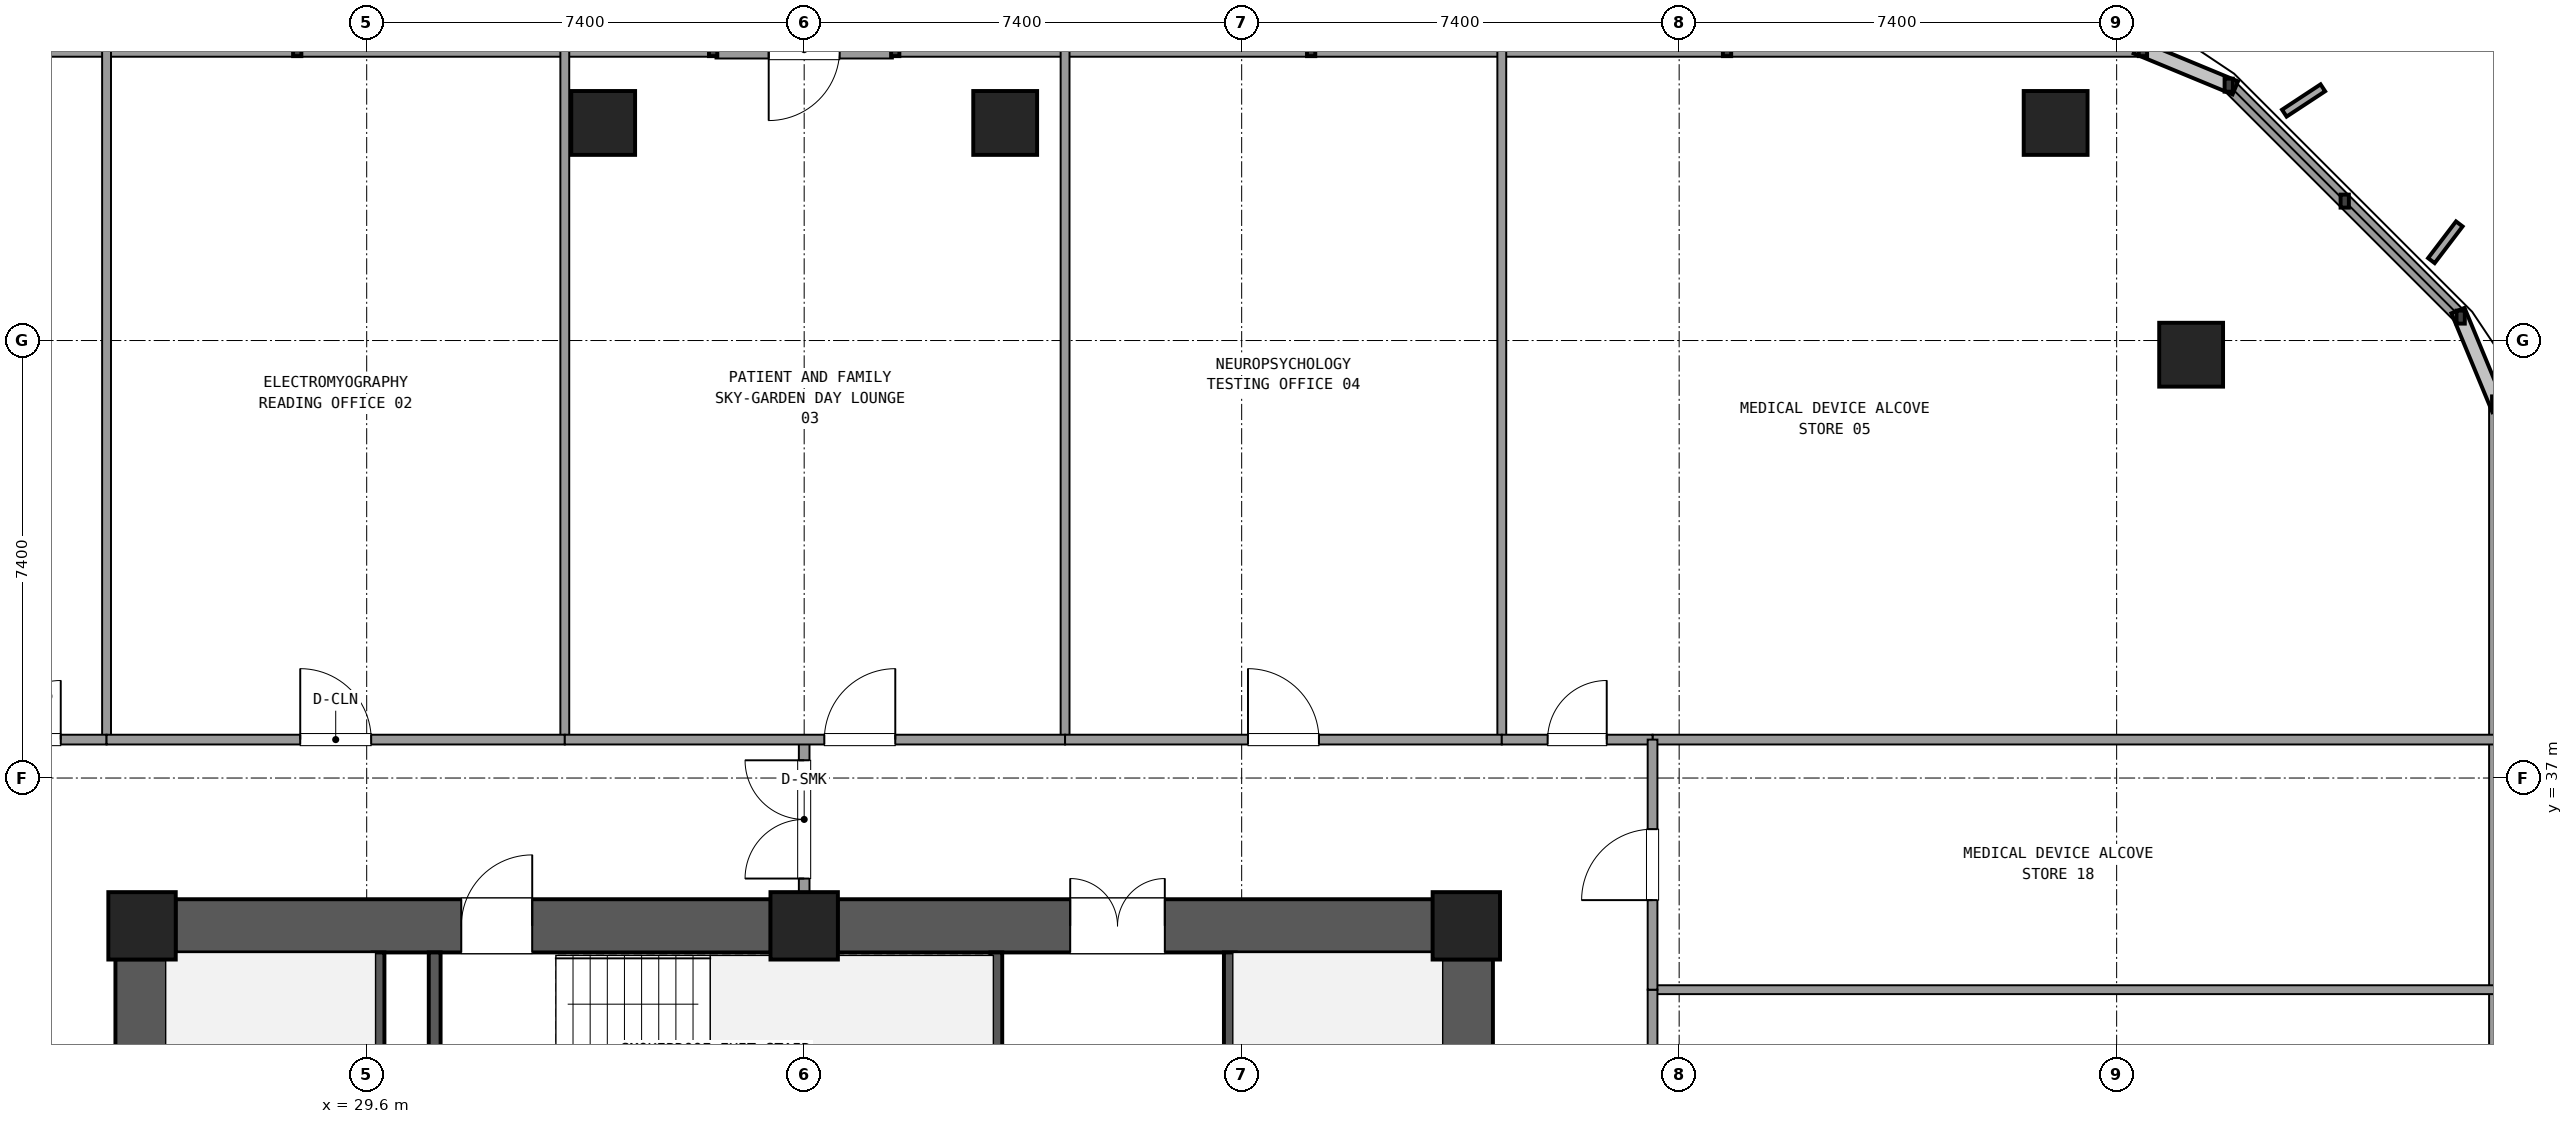
"""IFC4 building model, lengths in metres.
Left out: names, types, materials, properties, quantities, classifications, styles, units other than length and angle.
Written with IfcOpenShell. Run it as: python <this file> out.ifc"""

import sys

from ifc_helpers import new_model, si_unit, direction, frame, frame_2d, origin, origin_2d, place, context, subcontext, project, spatial, rectangle, extrude, element, fill, save


model = new_model("IFC4")
c1 = context("Model", 3, precision=1e-05, world=origin(), true_north=direction((0.0, 1.0)))
c2 = subcontext(c1, "Body", "Model", "MODEL_VIEW")
j1 = project(units=[si_unit("LENGTHUNIT", "METRE"), si_unit("PLANEANGLEUNIT", "RADIAN")], contexts=[c1])
p1 = place(None, origin())
s1 = spatial("IfcSite", under=j1, at=p1, CompositionType="ELEMENT")
p2 = place(p1, origin())
s2 = spatial("IfcBuilding", under=s1, at=p2, CompositionType="ELEMENT")
p3 = place(p2, frame((0.0, 0.0, 67.14)))
s3 = spatial("IfcBuildingStorey", under=s2, at=p3, CompositionType="ELEMENT", Elevation=67.14)
for number, where, z_axis, x_axis in (
    (1, (48.2, 34.5, 0.0), (0.0, 0.0, 1.0), (1.0, 0.0, 0.0)),
    (2, (37.0, 34.5, 0.0), (0.0, 0.0, 1.0), (1.0, 0.0, 0.0)),
    (3, (25.8, 34.5, 0.0), (0.0, 0.0, 1.0), (1.0, 0.0, 0.0)),
):
    element("IfcColumn", number, at=place(p3, frame(where, z_axis=z_axis, x_axis=x_axis)), inside=s3, PredefinedType="COLUMN", context=c2, shape_type="SweptSolid", body=[
        extrude(rectangle(XDim=1.14, YDim=1.14, at=origin_2d()), origin(), (0.0, 0.0, 1.0), 3.6),
    ])
p4 = place(p3, frame((48.2, 26.465, 0.0), z_axis=(0.0, 0.0, 1.0), x_axis=(0.0, 1.0, 0.0)))
e4 = element("IfcWall", 4, at=p4, inside=s3, PredefinedType="SHEAR", context=c2, shape_type="SweptSolid", body=[
    extrude(rectangle(XDim=7.47, YDim=0.9, at=frame_2d((3.735, 0.0))), origin(), (0.0, 0.0, 1.0), 3.3),
])
p5 = place(p3, frame((47.635, 34.5, 0.0), z_axis=(0.0, 0.0, 1.0), x_axis=(-1.0, 0.0, 0.0)))
e5 = element("IfcWall", 5, at=p5, inside=s3, PredefinedType="SHEAR", context=c2, shape_type="SweptSolid", body=[
    extrude(rectangle(XDim=10.07, YDim=0.9, at=frame_2d((5.035, 0.0))), origin(), (0.0, 0.0, 1.0), 3.3),
])
p6 = place(p5, frame((4.535, 0.0, 0.0)))
e6 = element("IfcOpeningElement", 6, at=p6, cuts=e5, PredefinedType="OPENING", context=c2, shape_type="SweptSolid", body=[
    extrude(rectangle(XDim=1.6, YDim=2.2, at=frame_2d((0.8, 1.1))), frame((0.0, 0.46, 0.0), z_axis=(0.0, -1.0, 0.0), x_axis=(1.0, 0.0, 0.0)), (0.0, 0.0, 1.0), 0.92),
])
p7 = place(p3, frame((36.435, 34.5, 0.0), z_axis=(0.0, 0.0, 1.0), x_axis=(-1.0, 0.0, 0.0)))
e7 = element("IfcWall", 7, at=p7, inside=s3, PredefinedType="SHEAR", context=c2, shape_type="SweptSolid", body=[
    extrude(rectangle(XDim=10.07, YDim=0.9, at=frame_2d((5.035, 0.0))), origin(), (0.0, 0.0, 1.0), 3.3),
])
p8 = place(p7, frame((4.035, 0.0, 0.0)))
e8 = element("IfcOpeningElement", 8, at=p8, cuts=e7, PredefinedType="OPENING", context=c2, shape_type="SweptSolid", body=[
    extrude(rectangle(XDim=1.2, YDim=2.15, at=frame_2d((0.6, 1.075))), frame((0.0, 0.46, 0.0), z_axis=(0.0, -1.0, 0.0), x_axis=(1.0, 0.0, 0.0)), (0.0, 0.0, 1.0), 0.92),
])
p9 = place(p3, frame((25.8, 33.935, 0.0), z_axis=(0.0, 0.0, 1.0), x_axis=(0.0, -1.0, 0.0)))
e9 = element("IfcWall", 9, at=p9, inside=s3, PredefinedType="SHEAR", context=c2, shape_type="SweptSolid", body=[
    extrude(rectangle(XDim=7.47, YDim=0.9, at=frame_2d((3.735, 0.0))), origin(), (0.0, 0.0, 1.0), 3.3),
])
for number, where, z_axis, x_axis in (
    (10, (60.46, 44.16, 0.0), (0.0, 0.0, 1.0), (1.0, 0.0, 0.0)),
    (11, (58.168, 48.08, 0.0), (0.0, 0.0, 1.0), (1.0, 0.0, 0.0)),
    (12, (40.4, 48.08, 0.0), (0.0, 0.0, 1.0), (1.0, 0.0, 0.0)),
    (13, (33.6, 48.08, 0.0), (0.0, 0.0, 1.0), (1.0, 0.0, 0.0)),
):
    element("IfcColumn", number, at=place(p3, frame(where, z_axis=z_axis, x_axis=x_axis)), inside=s3, PredefinedType="COLUMN", context=c2, shape_type="SweptSolid", body=[
        extrude(rectangle(XDim=1.08, YDim=1.08, at=origin_2d()), origin(), (0.0, 0.0, 1.0), 3.6),
    ])
p10 = place(p3, frame((65.62, 8.455, 0.0), z_axis=(0.0, 0.0, 1.0), x_axis=(0.0, 1.0, 0.0)))
e14 = element("IfcWall", 14, at=p10, inside=s3, PredefinedType="SOLIDWALL", context=c2, shape_type="SweptSolid", body=[
    extrude(rectangle(XDim=34.89, YDim=0.24, at=frame_2d((17.445, 0.0))), origin(), (0.0, 0.0, 1.0), 0.85),
])
p11 = place(p3, frame((65.019, 44.796, 0.0), z_axis=(0.0, 0.0, 1.0), x_axis=(-0.707106781187, 0.707106781187, 0.0)))
e15 = element("IfcWall", 15, at=p11, inside=s3, PredefinedType="SOLIDWALL", context=c2, shape_type="SweptSolid", body=[
    extrude(rectangle(XDim=5.548, YDim=0.24, at=frame_2d((2.774, 0.0))), origin(), (0.0, 0.0, 1.0), 0.85),
])
p12 = place(p3, frame((38.5, 49.32, 0.0), z_axis=(0.0, 0.0, 1.0), x_axis=(-1.0, 0.0, 0.0)))
e16 = element("IfcWall", 16, at=p12, inside=s3, PredefinedType="SOLIDWALL", context=c2, shape_type="SweptSolid", body=[
    extrude(rectangle(XDim=3.0, YDim=0.3, at=frame_2d((1.5, 0.0))), origin(), (0.0, 0.0, 1.0), 2.63),
])
p13 = place(p12, frame((0.9, 0.0, 0.0)))
e17 = element("IfcOpeningElement", 17, at=p13, cuts=e16, PredefinedType="OPENING", context=c2, shape_type="SweptSolid", body=[
    extrude(rectangle(XDim=1.2, YDim=2.2, at=frame_2d((0.6, 1.1))), frame((0.0, 0.16, 0.0), z_axis=(0.0, -1.0, 0.0), x_axis=(1.0, 0.0, 0.0)), (0.0, 0.0, 1.0), 0.32),
])
for number, where, z_axis, x_axis in (
    (18, (59.645, 49.32, 0.0), (0.0, 0.0, 1.0), (-1.0, 0.0, 0.0)),
    (19, (35.46, 49.32, 0.0), (0.0, 0.0, 1.0), (-1.0, 0.0, 0.0)),
):
    element("IfcWall", number, at=place(p3, frame(where, z_axis=z_axis, x_axis=x_axis)), inside=s3, PredefinedType="SOLIDWALL", context=c2, shape_type="SweptSolid", body=[
        extrude(rectangle(XDim=21.105, YDim=0.24, at=frame_2d((10.552, 0.0))), origin(), (0.0, 0.0, 1.0), 0.85),
    ])
for number, where, z_axis, x_axis in (
    (20, (29.8, 24.65, 0.0), (0.0, 0.0, 1.0), (0.0, 1.0, 0.0)),
    (21, (44.2, 24.65, 0.0), (0.0, 0.0, 1.0), (0.0, 1.0, 0.0)),
):
    element("IfcWall", number, at=place(p3, frame(where, z_axis=z_axis, x_axis=x_axis)), inside=s3, PredefinedType="SHEAR", context=c2, shape_type="SweptSolid", body=[
        extrude(rectangle(XDim=9.4, YDim=0.2, at=frame_2d((4.7, 0.0))), origin(), (0.0, 0.0, 1.0), 3.3),
    ])
for number, where, z_axis, x_axis in (
    (22, (30.75, 30.36, 0.0), (0.0, 0.0, 1.0), (0.0, 1.0, 0.0)),
    (23, (40.25, 30.36, 0.0), (0.0, 0.0, 1.0), (0.0, 1.0, 0.0)),
):
    element("IfcWall", number, at=place(p3, frame(where, z_axis=z_axis, x_axis=x_axis)), inside=s3, PredefinedType="SHEAR", context=c2, shape_type="SweptSolid", body=[
        extrude(rectangle(XDim=3.69, YDim=0.2, at=frame_2d((1.845, 0.0))), origin(), (0.0, 0.0, 1.0), 3.3),
    ])
p14 = place(p3, frame((37.0, 34.95, 0.0), z_axis=(0.0, 0.0, 1.0), x_axis=(0.0, 1.0, 0.0)))
e24 = element("IfcWall", 24, at=p14, inside=s3, PredefinedType="PARTITIONING", context=c2, shape_type="SweptSolid", body=[
    extrude(rectangle(XDim=2.7, YDim=0.18, at=frame_2d((1.35, 0.0))), origin(), (0.0, 0.0, 1.0), 2.59),
])
p15 = place(p14, frame((0.35, 0.0, 0.0)))
e25 = element("IfcOpeningElement", 25, at=p15, cuts=e24, PredefinedType="OPENING", context=c2, shape_type="SweptSolid", body=[
    extrude(rectangle(XDim=2.0, YDim=2.2, at=frame_2d((1.0, 1.1))), frame((0.0, 0.1, 0.0), z_axis=(0.0, -1.0, 0.0), x_axis=(1.0, 0.0, 0.0)), (0.0, 0.0, 1.0), 0.2),
])
p16 = place(p3, frame((51.35, 37.65, 0.0), z_axis=(0.0, 0.0, 1.0), x_axis=(1.0, 0.0, 0.0)))
e26 = element("IfcWall", 26, at=p16, inside=s3, PredefinedType="PARTITIONING", context=c2, shape_type="SweptSolid", body=[
    extrude(rectangle(XDim=14.25, YDim=0.165, at=frame_2d((7.125, 0.0))), origin(), (0.0, 0.0, 1.0), 2.59),
])
p17 = place(p3, frame((25.2, 37.65, 0.0), z_axis=(0.0, 0.0, 1.0), x_axis=(0.0, 1.0, 0.0)))
e27 = element("IfcWall", 27, at=p17, inside=s3, PredefinedType="PARTITIONING", context=c2, shape_type="SweptSolid", body=[
    extrude(rectangle(XDim=11.65, YDim=0.15, at=frame_2d((5.825, 0.0))), origin(), (0.0, 0.0, 1.0), 2.59),
])
p18 = place(p3, frame((22.65, 37.65, 0.0), z_axis=(0.0, 0.0, 1.0), x_axis=(1.0, 0.0, 0.0)))
e28 = element("IfcWall", 28, at=p18, inside=s3, PredefinedType="PARTITIONING", context=c2, shape_type="SweptSolid", body=[
    extrude(rectangle(XDim=2.55, YDim=0.165, at=frame_2d((1.275, 0.0))), origin(), (0.0, 0.0, 1.0), 2.59),
])
p19 = place(p18, frame((0.775, 0.0, 0.0)))
e29 = element("IfcOpeningElement", 29, at=p19, cuts=e28, PredefinedType="OPENING", context=c2, shape_type="SweptSolid", body=[
    extrude(rectangle(XDim=1.0, YDim=2.15, at=frame_2d((0.5, 1.075))), frame((0.0, 0.093, 0.0), z_axis=(0.0, -1.0, 0.0), x_axis=(1.0, 0.0, 0.0)), (0.0, 0.0, 1.0), 0.185),
])
p20 = place(p3, frame((32.951, 37.65, 0.0), z_axis=(0.0, 0.0, 1.0), x_axis=(0.0, 1.0, 0.0)))
e30 = element("IfcWall", 30, at=p20, inside=s3, PredefinedType="PARTITIONING", context=c2, shape_type="SweptSolid", body=[
    extrude(rectangle(XDim=11.65, YDim=0.15, at=frame_2d((5.825, 0.0))), origin(), (0.0, 0.0, 1.0), 2.59),
])
p21 = place(p3, frame((25.2, 37.65, 0.0), z_axis=(0.0, 0.0, 1.0), x_axis=(1.0, 0.0, 0.0)))
e31 = element("IfcWall", 31, at=p21, inside=s3, PredefinedType="PARTITIONING", context=c2, shape_type="SweptSolid", body=[
    extrude(rectangle(XDim=7.751, YDim=0.165, at=frame_2d((3.875, 0.0))), origin(), (0.0, 0.0, 1.0), 2.59),
])
p22 = place(p21, frame((3.276, 0.0, 0.0)))
e32 = element("IfcOpeningElement", 32, at=p22, cuts=e31, PredefinedType="OPENING", context=c2, shape_type="SweptSolid", body=[
    extrude(rectangle(XDim=1.2, YDim=2.15, at=frame_2d((0.6, 1.075))), frame((0.0, 0.093, 0.0), z_axis=(0.0, -1.0, 0.0), x_axis=(1.0, 0.0, 0.0)), (0.0, 0.0, 1.0), 0.185),
])
p23 = place(p3, frame((41.413, 37.65, 0.0), z_axis=(0.0, 0.0, 1.0), x_axis=(0.0, 1.0, 0.0)))
e33 = element("IfcWall", 33, at=p23, inside=s3, PredefinedType="PARTITIONING", context=c2, shape_type="SweptSolid", body=[
    extrude(rectangle(XDim=11.65, YDim=0.15, at=frame_2d((5.825, 0.0))), origin(), (0.0, 0.0, 1.0), 2.59),
])
p24 = place(p3, frame((32.951, 37.65, 0.0), z_axis=(0.0, 0.0, 1.0), x_axis=(1.0, 0.0, 0.0)))
e34 = element("IfcWall", 34, at=p24, inside=s3, PredefinedType="PARTITIONING", context=c2, shape_type="SweptSolid", body=[
    extrude(rectangle(XDim=8.462, YDim=0.165, at=frame_2d((4.231, 0.0))), origin(), (0.0, 0.0, 1.0), 2.59),
])
p25 = place(p24, frame((4.39, 0.0, 0.0)))
e35 = element("IfcOpeningElement", 35, at=p25, cuts=e34, PredefinedType="OPENING", context=c2, shape_type="SweptSolid", body=[
    extrude(rectangle(XDim=1.2, YDim=2.15, at=frame_2d((0.6, 1.075))), frame((0.0, 0.093, 0.0), z_axis=(0.0, -1.0, 0.0), x_axis=(1.0, 0.0, 0.0)), (0.0, 0.0, 1.0), 0.185),
])
p26 = place(p3, frame((48.8, 37.65, 0.0), z_axis=(0.0, 0.0, 1.0), x_axis=(0.0, 1.0, 0.0)))
e36 = element("IfcWall", 36, at=p26, inside=s3, PredefinedType="PARTITIONING", context=c2, shape_type="SweptSolid", body=[
    extrude(rectangle(XDim=11.65, YDim=0.15, at=frame_2d((5.825, 0.0))), origin(), (0.0, 0.0, 1.0), 2.59),
])
p27 = place(p3, frame((41.413, 37.65, 0.0), z_axis=(0.0, 0.0, 1.0), x_axis=(1.0, 0.0, 0.0)))
e37 = element("IfcWall", 37, at=p27, inside=s3, PredefinedType="PARTITIONING", context=c2, shape_type="SweptSolid", body=[
    extrude(rectangle(XDim=7.387, YDim=0.165, at=frame_2d((3.693, 0.0))), origin(), (0.0, 0.0, 1.0), 2.59),
])
p28 = place(p27, frame((3.094, 0.0, 0.0)))
e38 = element("IfcOpeningElement", 38, at=p28, cuts=e37, PredefinedType="OPENING", context=c2, shape_type="SweptSolid", body=[
    extrude(rectangle(XDim=1.2, YDim=2.15, at=frame_2d((0.6, 1.075))), frame((0.0, 0.093, 0.0), z_axis=(0.0, -1.0, 0.0), x_axis=(1.0, 0.0, 0.0)), (0.0, 0.0, 1.0), 0.185),
])
p29 = place(p3, frame((48.8, 37.65, 0.0), z_axis=(0.0, 0.0, 1.0), x_axis=(1.0, 0.0, 0.0)))
e39 = element("IfcWall", 39, at=p29, inside=s3, PredefinedType="PARTITIONING", context=c2, shape_type="SweptSolid", body=[
    extrude(rectangle(XDim=2.55, YDim=0.165, at=frame_2d((1.275, 0.0))), origin(), (0.0, 0.0, 1.0), 2.59),
])
p30 = place(p29, frame((0.775, 0.0, 0.0)))
e40 = element("IfcOpeningElement", 40, at=p30, cuts=e39, PredefinedType="OPENING", context=c2, shape_type="SweptSolid", body=[
    extrude(rectangle(XDim=1.0, YDim=2.15, at=frame_2d((0.5, 1.075))), frame((0.0, 0.093, 0.0), z_axis=(0.0, -1.0, 0.0), x_axis=(1.0, 0.0, 0.0)), (0.0, 0.0, 1.0), 0.185),
])
p31 = place(p3, frame((51.35, 33.42, 0.0), z_axis=(0.0, 0.0, 1.0), x_axis=(1.0, 0.0, 0.0)))
e41 = element("IfcWall", 41, at=p31, inside=s3, PredefinedType="PARTITIONING", context=c2, shape_type="SweptSolid", body=[
    extrude(rectangle(XDim=14.25, YDim=0.15, at=frame_2d((7.125, 0.0))), origin(), (0.0, 0.0, 1.0), 2.59),
])
p32 = place(p3, frame((51.35, 27.545, 0.0), z_axis=(0.0, 0.0, 1.0), x_axis=(0.0, 1.0, 0.0)))
e42 = element("IfcWall", 42, at=p32, inside=s3, PredefinedType="PARTITIONING", context=c2, shape_type="SweptSolid", body=[
    extrude(rectangle(XDim=5.875, YDim=0.165, at=frame_2d((2.938, 0.0))), origin(), (0.0, 0.0, 1.0), 2.59),
])
p33 = place(p32, frame((2.337, 0.0, 0.0)))
e43 = element("IfcOpeningElement", 43, at=p33, cuts=e42, PredefinedType="OPENING", context=c2, shape_type="SweptSolid", body=[
    extrude(rectangle(XDim=1.2, YDim=2.15, at=frame_2d((0.6, 1.075))), frame((0.0, 0.093, 0.0), z_axis=(0.0, -1.0, 0.0), x_axis=(1.0, 0.0, 0.0)), (0.0, 0.0, 1.0), 0.185),
])
p34 = place(p3, frame((51.35, 33.42, 0.0), z_axis=(0.0, 0.0, 1.0), x_axis=(0.0, 1.0, 0.0)))
e44 = element("IfcWall", 44, at=p34, inside=s3, PredefinedType="PARTITIONING", context=c2, shape_type="SweptSolid", body=[
    extrude(rectangle(XDim=4.23, YDim=0.165, at=frame_2d((2.115, 0.0))), origin(), (0.0, 0.0, 1.0), 2.59),
])
p35 = place(p34, frame((1.515, 0.0, 0.0)))
e45 = element("IfcOpeningElement", 45, at=p35, cuts=e44, PredefinedType="OPENING", context=c2, shape_type="SweptSolid", body=[
    extrude(rectangle(XDim=1.2, YDim=2.15, at=frame_2d((0.6, 1.075))), frame((0.0, 0.093, 0.0), z_axis=(0.0, -1.0, 0.0), x_axis=(1.0, 0.0, 0.0)), (0.0, 0.0, 1.0), 0.185),
])
p36 = place(p6, frame((1.6, 0.0, 0.0), z_axis=(0.0, 0.0, 1.0), x_axis=(-1.0, 0.0, 0.0)))
e46 = element("IfcDoor", 46, at=p36, inside=s3, OperationType="DOUBLE_DOOR_SINGLE_SWING", PredefinedType="DOOR", context=c2, shape_type="SweptSolid", body=[
    extrude(rectangle(XDim=1.6, YDim=2.2, at=frame_2d((0.8, 1.1))), frame((0.0, 0.025, 0.0), z_axis=(0.0, -1.0, 0.0), x_axis=(1.0, 0.0, 0.0)), (0.0, 0.0, 1.0), 0.05),
])
fill(e6, e46)
p37 = place(p8, frame((1.2, 0.0, 0.0), z_axis=(0.0, 0.0, 1.0), x_axis=(-1.0, 0.0, 0.0)))
e47 = element("IfcDoor", 47, at=p37, inside=s3, OperationType="SINGLE_SWING_LEFT", PredefinedType="DOOR", context=c2, shape_type="SweptSolid", body=[
    extrude(rectangle(XDim=1.2, YDim=2.15, at=frame_2d((0.6, 1.075))), frame((0.0, 0.025, 0.0), z_axis=(0.0, -1.0, 0.0), x_axis=(1.0, 0.0, 0.0)), (0.0, 0.0, 1.0), 0.05),
])
fill(e8, e47)
p38 = place(p15, origin())
e48 = element("IfcDoor", 48, at=p38, inside=s3, OperationType="DOUBLE_DOOR_SINGLE_SWING", PredefinedType="DOOR", context=c2, shape_type="SweptSolid", body=[
    extrude(rectangle(XDim=2.0, YDim=2.2, at=frame_2d((1.0, 1.1))), frame((0.0, 0.025, 0.0), z_axis=(0.0, -1.0, 0.0), x_axis=(1.0, 0.0, 0.0)), (0.0, 0.0, 1.0), 0.05),
])
fill(e25, e48)
p39 = place(p19, origin())
e49 = element("IfcDoor", 49, at=p39, inside=s3, OperationType="SINGLE_SWING_RIGHT", PredefinedType="DOOR", context=c2, shape_type="SweptSolid", body=[
    extrude(rectangle(XDim=1.0, YDim=2.15, at=frame_2d((0.5, 1.075))), frame((0.0, 0.025, 0.0), z_axis=(0.0, -1.0, 0.0), x_axis=(1.0, 0.0, 0.0)), (0.0, 0.0, 1.0), 0.05),
])
fill(e29, e49)
p40 = place(p22, origin())
e50 = element("IfcDoor", 50, at=p40, inside=s3, OperationType="SINGLE_SWING_LEFT", PredefinedType="DOOR", context=c2, shape_type="SweptSolid", body=[
    extrude(rectangle(XDim=1.2, YDim=2.15, at=frame_2d((0.6, 1.075))), frame((0.0, 0.025, 0.0), z_axis=(0.0, -1.0, 0.0), x_axis=(1.0, 0.0, 0.0)), (0.0, 0.0, 1.0), 0.05),
])
fill(e32, e50)
p41 = place(p25, origin())
e51 = element("IfcDoor", 51, at=p41, inside=s3, OperationType="SINGLE_SWING_RIGHT", PredefinedType="DOOR", context=c2, shape_type="SweptSolid", body=[
    extrude(rectangle(XDim=1.2, YDim=2.15, at=frame_2d((0.6, 1.075))), frame((0.0, 0.025, 0.0), z_axis=(0.0, -1.0, 0.0), x_axis=(1.0, 0.0, 0.0)), (0.0, 0.0, 1.0), 0.05),
])
fill(e35, e51)
p42 = place(p28, origin())
e52 = element("IfcDoor", 52, at=p42, inside=s3, OperationType="SINGLE_SWING_LEFT", PredefinedType="DOOR", context=c2, shape_type="SweptSolid", body=[
    extrude(rectangle(XDim=1.2, YDim=2.15, at=frame_2d((0.6, 1.075))), frame((0.0, 0.025, 0.0), z_axis=(0.0, -1.0, 0.0), x_axis=(1.0, 0.0, 0.0)), (0.0, 0.0, 1.0), 0.05),
])
fill(e38, e52)
p43 = place(p30, origin())
e53 = element("IfcDoor", 53, at=p43, inside=s3, OperationType="SINGLE_SWING_RIGHT", PredefinedType="DOOR", context=c2, shape_type="SweptSolid", body=[
    extrude(rectangle(XDim=1.0, YDim=2.15, at=frame_2d((0.5, 1.075))), frame((0.0, 0.025, 0.0), z_axis=(0.0, -1.0, 0.0), x_axis=(1.0, 0.0, 0.0)), (0.0, 0.0, 1.0), 0.05),
])
fill(e40, e53)
p44 = place(p35, origin())
e54 = element("IfcDoor", 54, at=p44, inside=s3, OperationType="SINGLE_SWING_LEFT", PredefinedType="DOOR", context=c2, shape_type="SweptSolid", body=[
    extrude(rectangle(XDim=1.2, YDim=2.15, at=frame_2d((0.6, 1.075))), frame((0.0, 0.025, 0.0), z_axis=(0.0, -1.0, 0.0), x_axis=(1.0, 0.0, 0.0)), (0.0, 0.0, 1.0), 0.05),
])
fill(e45, e54)
save(model, sys.argv[1])
